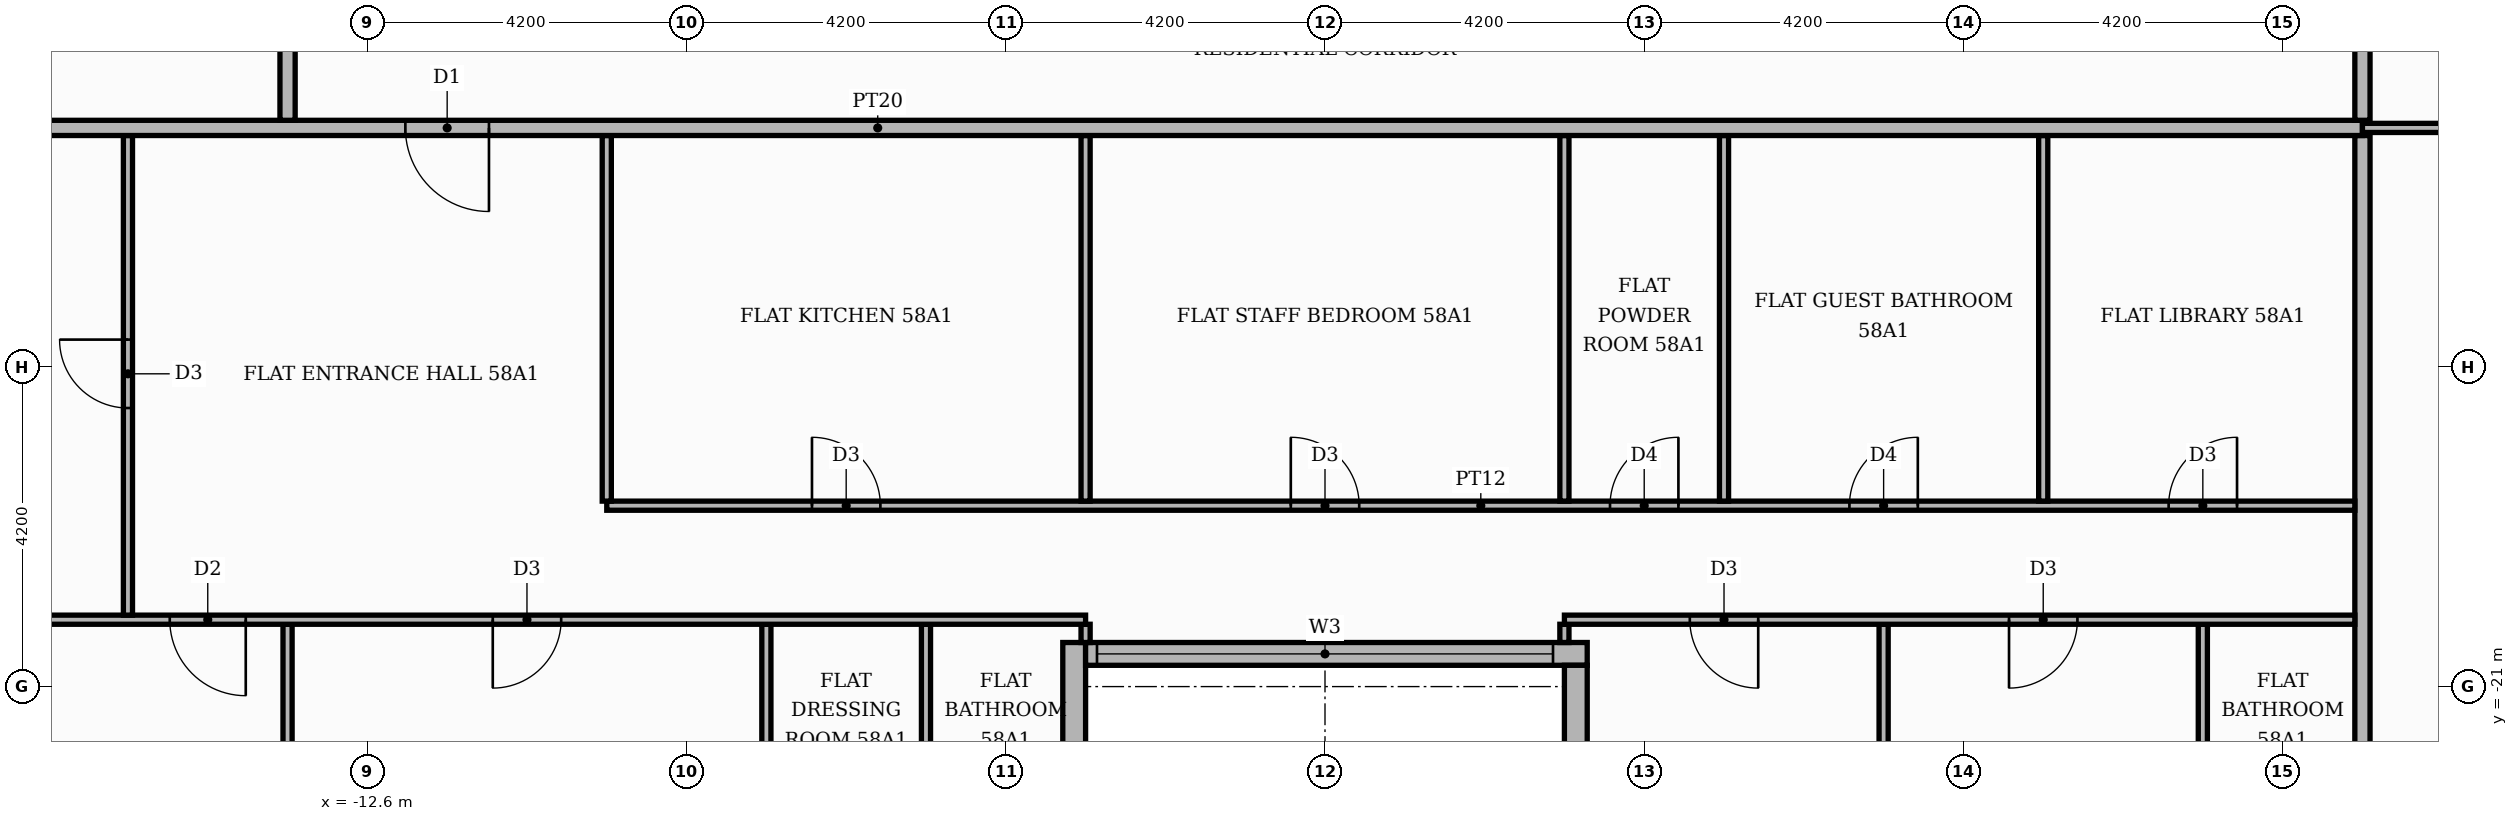
"""IFC4 building model, lengths in metres.
Left out: names, types, materials, properties, quantities, classifications, styles, units other than length and angle.
Written with IfcOpenShell. Run it as: python <this file> out.ifc"""

import sys

from ifc_helpers import new_model, si_unit, direction, frame, frame_2d, origin, place, context, subcontext, project, spatial, rectangle, extrude, element, fill, save


model = new_model("IFC4")
c1 = context("Model", 3, precision=1e-05, world=origin(), true_north=direction((0.0, 1.0)))
c2 = subcontext(c1, "Body", "Model", "MODEL_VIEW")
j1 = project(units=[si_unit("LENGTHUNIT", "METRE"), si_unit("PLANEANGLEUNIT", "RADIAN")], contexts=[c1])
p1 = place(None, origin())
s1 = spatial("IfcSite", under=j1, at=p1, CompositionType="ELEMENT")
p2 = place(p1, origin())
s2 = spatial("IfcBuilding", under=s1, at=p2, CompositionType="ELEMENT")
p3 = place(p2, frame((0.0, 0.0, 244.5)))
s3 = spatial("IfcBuildingStorey", under=s2, at=p3, CompositionType="ELEMENT", Elevation=244.5)
p4 = place(p3, frame((-3.3, -25.42, 0.0), z_axis=(0.0, 0.0, 1.0), x_axis=(0.0, 1.0, 0.0)))
e1 = element("IfcWall", 1, at=p4, inside=s3, PredefinedType="STANDARD", context=c2, shape_type="SweptSolid", body=[
    extrude(rectangle(XDim=5.0, YDim=0.3, at=frame_2d((2.5, 0.0))), origin(), (0.0, 0.0, 1.0), 3.48),
])
p5 = place(p4, frame((1.42, 0.0, 0.9)))
e2 = element("IfcOpeningElement", 2, at=p5, cuts=e1, PredefinedType="OPENING", context=c2, shape_type="SweptSolid", body=[
    extrude(rectangle(XDim=1.8, YDim=2.1, at=frame_2d((0.9, 1.05))), frame((0.0, 0.16, 0.0), z_axis=(0.0, -1.0, 0.0), x_axis=(1.0, 0.0, 0.0)), (0.0, 0.0, 1.0), 0.32),
])
p6 = place(p3, frame((-3.15, -20.57, 0.0), z_axis=(0.0, 0.0, 1.0), x_axis=(1.0, 0.0, 0.0)))
e3 = element("IfcWall", 3, at=p6, inside=s3, PredefinedType="STANDARD", context=c2, shape_type="SweptSolid", body=[
    extrude(rectangle(XDim=6.6, YDim=0.3, at=frame_2d((3.3, 0.0))), origin(), (0.0, 0.0, 1.0), 3.48),
])
p7 = place(p6, frame((0.15, 0.0, 0.9)))
e4 = element("IfcOpeningElement", 4, at=p7, cuts=e3, PredefinedType="OPENING", context=c2, shape_type="SweptSolid", body=[
    extrude(rectangle(XDim=6.0, YDim=2.1, at=frame_2d((3.0, 1.05))), frame((0.0, 0.16, 0.0), z_axis=(0.0, -1.0, 0.0), x_axis=(1.0, 0.0, 0.0)), (0.0, 0.0, 1.0), 0.32),
])
p8 = place(p3, frame((3.3, -20.72, 0.0), z_axis=(0.0, 0.0, 1.0), x_axis=(0.0, -1.0, 0.0)))
e5 = element("IfcWall", 5, at=p8, inside=s3, PredefinedType="STANDARD", context=c2, shape_type="SweptSolid", body=[
    extrude(rectangle(XDim=5.0, YDim=0.3, at=frame_2d((2.5, 0.0))), origin(), (0.0, 0.0, 1.0), 3.48),
])
p9 = place(p8, frame((1.48, 0.0, 0.9)))
e6 = element("IfcOpeningElement", 6, at=p9, cuts=e5, PredefinedType="OPENING", context=c2, shape_type="SweptSolid", body=[
    extrude(rectangle(XDim=1.8, YDim=2.1, at=frame_2d((0.9, 1.05))), frame((0.0, 0.16, 0.0), z_axis=(0.0, -1.0, 0.0), x_axis=(1.0, 0.0, 0.0)), (0.0, 0.0, 1.0), 0.32),
])
p10 = place(p3, frame((-13.65, -25.42, 0.0), z_axis=(0.0, 0.0, 1.0), x_axis=(0.0, 1.0, 0.0)))
e7 = element("IfcWall", 7, at=p10, inside=s3, PredefinedType="PARTITIONING", context=c2, shape_type="SweptSolid", body=[
    extrude(rectangle(XDim=5.24, YDim=0.12, at=frame_2d((2.62, 0.0))), origin(), (0.0, 0.0, 1.0), 3.48),
])
p11 = place(p3, frame((-7.35, -25.42, 0.0), z_axis=(0.0, 0.0, 1.0), x_axis=(0.0, 1.0, 0.0)))
e8 = element("IfcWall", 8, at=p11, inside=s3, PredefinedType="PARTITIONING", context=c2, shape_type="SweptSolid", body=[
    extrude(rectangle(XDim=5.24, YDim=0.12, at=frame_2d((2.62, 0.0))), origin(), (0.0, 0.0, 1.0), 3.48),
])
p12 = place(p11, frame((2.05, 0.0, 0.0)))
e9 = element("IfcOpeningElement", 9, at=p12, cuts=e8, PredefinedType="OPENING", context=c2, shape_type="SweptSolid", body=[
    extrude(rectangle(XDim=0.9, YDim=2.1, at=frame_2d((0.45, 1.05))), frame((0.0, 0.07, 0.0), z_axis=(0.0, -1.0, 0.0), x_axis=(1.0, 0.0, 0.0)), (0.0, 0.0, 1.0), 0.14),
])
p13 = place(p3, frame((-5.25, -25.42, 0.0), z_axis=(0.0, 0.0, 1.0), x_axis=(0.0, 1.0, 0.0)))
e10 = element("IfcWall", 10, at=p13, inside=s3, PredefinedType="PARTITIONING", context=c2, shape_type="SweptSolid", body=[
    extrude(rectangle(XDim=5.24, YDim=0.12, at=frame_2d((2.62, 0.0))), origin(), (0.0, 0.0, 1.0), 3.48),
])
p14 = place(p13, frame((2.05, 0.0, 0.0)))
e11 = element("IfcOpeningElement", 11, at=p14, cuts=e10, PredefinedType="OPENING", context=c2, shape_type="SweptSolid", body=[
    extrude(rectangle(XDim=0.9, YDim=2.1, at=frame_2d((0.45, 1.05))), frame((0.0, 0.07, 0.0), z_axis=(0.0, -1.0, 0.0), x_axis=(1.0, 0.0, 0.0)), (0.0, 0.0, 1.0), 0.14),
])
p15 = place(p3, frame((7.35, -25.42, 0.0), z_axis=(0.0, 0.0, 1.0), x_axis=(0.0, 1.0, 0.0)))
e12 = element("IfcWall", 12, at=p15, inside=s3, PredefinedType="PARTITIONING", context=c2, shape_type="SweptSolid", body=[
    extrude(rectangle(XDim=5.24, YDim=0.12, at=frame_2d((2.62, 0.0))), origin(), (0.0, 0.0, 1.0), 3.48),
])
p16 = place(p3, frame((11.55, -25.42, 0.0), z_axis=(0.0, 0.0, 1.0), x_axis=(0.0, 1.0, 0.0)))
e13 = element("IfcWall", 13, at=p16, inside=s3, PredefinedType="PARTITIONING", context=c2, shape_type="SweptSolid", body=[
    extrude(rectangle(XDim=5.24, YDim=0.12, at=frame_2d((2.62, 0.0))), origin(), (0.0, 0.0, 1.0), 3.48),
])
p17 = place(p16, frame((2.05, 0.0, 0.0)))
e14 = element("IfcOpeningElement", 14, at=p17, cuts=e13, PredefinedType="OPENING", context=c2, shape_type="SweptSolid", body=[
    extrude(rectangle(XDim=0.9, YDim=2.1, at=frame_2d((0.45, 1.05))), frame((0.0, 0.07, 0.0), z_axis=(0.0, -1.0, 0.0), x_axis=(1.0, 0.0, 0.0)), (0.0, 0.0, 1.0), 0.14),
])
p18 = place(p3, frame((13.65, -25.42, 0.0), z_axis=(0.0, 0.0, 1.0), x_axis=(0.0, 1.0, 0.0)))
e15 = element("IfcWall", 15, at=p18, inside=s3, PredefinedType="PARTITIONING", context=c2, shape_type="SweptSolid", body=[
    extrude(rectangle(XDim=11.67, YDim=0.2, at=frame_2d((5.835, 0.0))), origin(), (0.0, 0.0, 1.0), 3.48),
])
for number, where, z_axis, x_axis in (
    (16, (-3.15, -20.42, 0.0), (0.0, 0.0, 1.0), (0.0, 1.0, 0.0)),
    (17, (3.15, -20.42, 0.0), (0.0, 0.0, 1.0), (0.0, 1.0, 0.0)),
):
    element("IfcWall", number, at=place(p3, frame(where, z_axis=z_axis, x_axis=x_axis)), inside=s3, PredefinedType="PARTITIONING", context=c2, shape_type="SweptSolid", body=[
        extrude(rectangle(XDim=0.24, YDim=0.12, at=frame_2d((0.12, 0.0))), origin(), (0.0, 0.0, 1.0), 3.48),
    ])
p19 = place(p3, frame((-20.719, -20.12, 0.0), z_axis=(0.0, 0.0, 1.0), x_axis=(1.0, 0.0, 0.0)))
e18 = element("IfcWall", 18, at=p19, inside=s3, PredefinedType="PARTITIONING", context=c2, shape_type="SweptSolid", body=[
    extrude(rectangle(XDim=17.569, YDim=0.12, at=frame_2d((8.785, 0.0))), origin(), (0.0, 0.0, 1.0), 3.48),
])
p20 = place(p19, frame((5.519, 0.0, 0.0)))
e19 = element("IfcOpeningElement", 19, at=p20, cuts=e18, PredefinedType="OPENING", context=c2, shape_type="SweptSolid", body=[
    extrude(rectangle(XDim=1.0, YDim=2.1, at=frame_2d((0.5, 1.05))), frame((0.0, 0.07, 0.0), z_axis=(0.0, -1.0, 0.0), x_axis=(1.0, 0.0, 0.0)), (0.0, 0.0, 1.0), 0.14),
])
p21 = place(p19, frame((9.769, 0.0, 0.0)))
e20 = element("IfcOpeningElement", 20, at=p21, cuts=e18, PredefinedType="OPENING", context=c2, shape_type="SweptSolid", body=[
    extrude(rectangle(XDim=0.9, YDim=2.1, at=frame_2d((0.45, 1.05))), frame((0.0, 0.07, 0.0), z_axis=(0.0, -1.0, 0.0), x_axis=(1.0, 0.0, 0.0)), (0.0, 0.0, 1.0), 0.14),
])
p22 = place(p3, frame((3.15, -20.12, 0.0), z_axis=(0.0, 0.0, 1.0), x_axis=(1.0, 0.0, 0.0)))
e21 = element("IfcWall", 21, at=p22, inside=s3, PredefinedType="PARTITIONING", context=c2, shape_type="SweptSolid", body=[
    extrude(rectangle(XDim=10.4, YDim=0.12, at=frame_2d((5.2, 0.0))), origin(), (0.0, 0.0, 1.0), 3.48),
])
p23 = place(p22, frame((1.65, 0.0, 0.0)))
e22 = element("IfcOpeningElement", 22, at=p23, cuts=e21, PredefinedType="OPENING", context=c2, shape_type="SweptSolid", body=[
    extrude(rectangle(XDim=0.9, YDim=2.1, at=frame_2d((0.45, 1.05))), frame((0.0, 0.07, 0.0), z_axis=(0.0, -1.0, 0.0), x_axis=(1.0, 0.0, 0.0)), (0.0, 0.0, 1.0), 0.14),
])
p24 = place(p22, frame((5.85, 0.0, 0.0)))
e23 = element("IfcOpeningElement", 23, at=p24, cuts=e21, PredefinedType="OPENING", context=c2, shape_type="SweptSolid", body=[
    extrude(rectangle(XDim=0.9, YDim=2.1, at=frame_2d((0.45, 1.05))), frame((0.0, 0.07, 0.0), z_axis=(0.0, -1.0, 0.0), x_axis=(1.0, 0.0, 0.0)), (0.0, 0.0, 1.0), 0.14),
])
p25 = place(p3, frame((-15.75, -20.06, 0.0), z_axis=(0.0, 0.0, 1.0), x_axis=(0.0, 1.0, 0.0)))
e24 = element("IfcWall", 24, at=p25, inside=s3, PredefinedType="PARTITIONING", context=c2, shape_type="SweptSolid", body=[
    extrude(rectangle(XDim=6.31, YDim=0.12, at=frame_2d((3.155, 0.0))), origin(), (0.0, 0.0, 1.0), 3.48),
])
p26 = place(p25, frame((2.725, 0.0, 0.0)))
e25 = element("IfcOpeningElement", 25, at=p26, cuts=e24, PredefinedType="OPENING", context=c2, shape_type="SweptSolid", body=[
    extrude(rectangle(XDim=0.9, YDim=2.1, at=frame_2d((0.45, 1.05))), frame((0.0, 0.07, 0.0), z_axis=(0.0, -1.0, 0.0), x_axis=(1.0, 0.0, 0.0)), (0.0, 0.0, 1.0), 0.14),
])
p27 = place(p3, frame((-9.45, -18.62, 0.0), z_axis=(0.0, 0.0, 1.0), x_axis=(1.0, 0.0, 0.0)))
e26 = element("IfcWall", 26, at=p27, inside=s3, PredefinedType="PARTITIONING", context=c2, shape_type="SweptSolid", body=[
    extrude(rectangle(XDim=23.0, YDim=0.12, at=frame_2d((11.5, 0.0))), origin(), (0.0, 0.0, 1.0), 3.48),
])
p28 = place(p27, frame((2.7, 0.0, 0.0)))
e27 = element("IfcOpeningElement", 27, at=p28, cuts=e26, PredefinedType="OPENING", context=c2, shape_type="SweptSolid", body=[
    extrude(rectangle(XDim=0.9, YDim=2.1, at=frame_2d((0.45, 1.05))), frame((0.0, 0.07, 0.0), z_axis=(0.0, -1.0, 0.0), x_axis=(1.0, 0.0, 0.0)), (0.0, 0.0, 1.0), 0.14),
])
p29 = place(p27, frame((9.0, 0.0, 0.0)))
e28 = element("IfcOpeningElement", 28, at=p29, cuts=e26, PredefinedType="OPENING", context=c2, shape_type="SweptSolid", body=[
    extrude(rectangle(XDim=0.9, YDim=2.1, at=frame_2d((0.45, 1.05))), frame((0.0, 0.07, 0.0), z_axis=(0.0, -1.0, 0.0), x_axis=(1.0, 0.0, 0.0)), (0.0, 0.0, 1.0), 0.14),
])
p30 = place(p27, frame((13.2, 0.0, 0.0)))
e29 = element("IfcOpeningElement", 29, at=p30, cuts=e26, PredefinedType="OPENING", context=c2, shape_type="SweptSolid", body=[
    extrude(rectangle(XDim=0.9, YDim=2.1, at=frame_2d((0.45, 1.05))), frame((0.0, 0.07, 0.0), z_axis=(0.0, -1.0, 0.0), x_axis=(1.0, 0.0, 0.0)), (0.0, 0.0, 1.0), 0.14),
])
p31 = place(p27, frame((16.35, 0.0, 0.0)))
e30 = element("IfcOpeningElement", 30, at=p31, cuts=e26, PredefinedType="OPENING", context=c2, shape_type="SweptSolid", body=[
    extrude(rectangle(XDim=0.9, YDim=2.1, at=frame_2d((0.45, 1.05))), frame((0.0, 0.07, 0.0), z_axis=(0.0, -1.0, 0.0), x_axis=(1.0, 0.0, 0.0)), (0.0, 0.0, 1.0), 0.14),
])
p32 = place(p27, frame((20.55, 0.0, 0.0)))
e31 = element("IfcOpeningElement", 31, at=p32, cuts=e26, PredefinedType="OPENING", context=c2, shape_type="SweptSolid", body=[
    extrude(rectangle(XDim=0.9, YDim=2.1, at=frame_2d((0.45, 1.05))), frame((0.0, 0.07, 0.0), z_axis=(0.0, -1.0, 0.0), x_axis=(1.0, 0.0, 0.0)), (0.0, 0.0, 1.0), 0.14),
])
for number, where, z_axis, x_axis in (
    (32, (-9.45, -18.56, 0.0), (0.0, 0.0, 1.0), (0.0, 1.0, 0.0)),
    (33, (-3.15, -18.56, 0.0), (0.0, 0.0, 1.0), (0.0, 1.0, 0.0)),
    (34, (3.15, -18.56, 0.0), (0.0, 0.0, 1.0), (0.0, 1.0, 0.0)),
    (35, (5.25, -18.56, 0.0), (0.0, 0.0, 1.0), (0.0, 1.0, 0.0)),
    (36, (9.45, -18.56, 0.0), (0.0, 0.0, 1.0), (0.0, 1.0, 0.0)),
):
    element("IfcWall", number, at=place(p3, frame(where, z_axis=z_axis, x_axis=x_axis)), inside=s3, PredefinedType="PARTITIONING", context=c2, shape_type="SweptSolid", body=[
        extrude(rectangle(XDim=4.81, YDim=0.12, at=frame_2d((2.405, 0.0))), origin(), (0.0, 0.0, 1.0), 3.48),
    ])
p33 = place(p3, frame((-25.42, -13.65, 0.0), z_axis=(0.0, 0.0, 1.0), x_axis=(1.0, 0.0, 0.0)))
e37 = element("IfcWall", 37, at=p33, inside=s3, PredefinedType="PARTITIONING", context=c2, shape_type="SweptSolid", body=[
    extrude(rectangle(XDim=39.07, YDim=0.2, at=frame_2d((19.535, 0.0))), origin(), (0.0, 0.0, 1.0), 3.48),
])
p34 = place(p33, frame((13.32, 0.0, 0.0)))
e38 = element("IfcOpeningElement", 38, at=p34, cuts=e37, PredefinedType="OPENING", context=c2, shape_type="SweptSolid", body=[
    extrude(rectangle(XDim=1.1, YDim=2.4, at=frame_2d((0.55, 1.2))), frame((0.0, 0.11, 0.0), z_axis=(0.0, -1.0, 0.0), x_axis=(1.0, 0.0, 0.0)), (0.0, 0.0, 1.0), 0.22),
])
p35 = place(p3, frame((13.65, -13.65, 0.0), z_axis=(0.0, 0.0, 1.0), x_axis=(1.0, 0.0, 0.0)))
e39 = element("IfcWall", 39, at=p35, inside=s3, PredefinedType="PARTITIONING", context=c2, shape_type="SweptSolid", body=[
    extrude(rectangle(XDim=7.07, YDim=0.12, at=frame_2d((3.535, 0.0))), origin(), (0.0, 0.0, 1.0), 3.48),
])
p36 = place(p35, frame((3.085, 0.0, 0.0)))
e40 = element("IfcOpeningElement", 40, at=p36, cuts=e39, PredefinedType="OPENING", context=c2, shape_type="SweptSolid", body=[
    extrude(rectangle(XDim=0.9, YDim=2.1, at=frame_2d((0.45, 1.05))), frame((0.0, 0.07, 0.0), z_axis=(0.0, -1.0, 0.0), x_axis=(1.0, 0.0, 0.0)), (0.0, 0.0, 1.0), 0.14),
])
for number, where, z_axis, x_axis in (
    (41, (-13.65, -13.55, 0.0), (0.0, 0.0, 1.0), (0.0, 1.0, 0.0)),
    (42, (13.65, -13.55, 0.0), (0.0, 0.0, 1.0), (0.0, 1.0, 0.0)),
):
    element("IfcWall", number, at=place(p3, frame(where, z_axis=z_axis, x_axis=x_axis)), inside=s3, PredefinedType="PARTITIONING", context=c2, shape_type="SweptSolid", body=[
        extrude(rectangle(XDim=2.45, YDim=0.2, at=frame_2d((1.225, 0.0))), origin(), (0.0, 0.0, 1.0), 3.48),
    ])
p37 = place(p7, origin())
e43 = element("IfcWindow", 43, at=p37, inside=s3, PartitioningType="SINGLE_PANEL", PredefinedType="WINDOW", context=c2, shape_type="SweptSolid", body=[
    extrude(rectangle(XDim=6.0, YDim=2.1, at=frame_2d((3.0, 1.05))), frame((0.0, 0.03, 0.0), z_axis=(0.0, -1.0, 0.0), x_axis=(1.0, 0.0, 0.0)), (0.0, 0.0, 1.0), 0.06),
])
fill(e4, e43)
p38 = place(p34, frame((1.1, 0.0, 0.0), z_axis=(0.0, 0.0, 1.0), x_axis=(-1.0, 0.0, 0.0)))
e44 = element("IfcDoor", 44, at=p38, inside=s3, OperationType="SINGLE_SWING_RIGHT", PredefinedType="DOOR", context=c2, shape_type="SweptSolid", body=[
    extrude(rectangle(XDim=1.1, YDim=2.4, at=frame_2d((0.55, 1.2))), frame((0.0, 0.025, 0.0), z_axis=(0.0, -1.0, 0.0), x_axis=(1.0, 0.0, 0.0)), (0.0, 0.0, 1.0), 0.05),
])
fill(e38, e44)
p39 = place(p26, origin())
e45 = element("IfcDoor", 45, at=p39, inside=s3, OperationType="SINGLE_SWING_RIGHT", PredefinedType="DOOR", context=c2, shape_type="SweptSolid", body=[
    extrude(rectangle(XDim=0.9, YDim=2.1, at=frame_2d((0.45, 1.05))), frame((0.0, 0.025, 0.0), z_axis=(0.0, -1.0, 0.0), x_axis=(1.0, 0.0, 0.0)), (0.0, 0.0, 1.0), 0.05),
])
fill(e25, e45)
p40 = place(p28, origin())
e46 = element("IfcDoor", 46, at=p40, inside=s3, OperationType="SINGLE_SWING_LEFT", PredefinedType="DOOR", context=c2, shape_type="SweptSolid", body=[
    extrude(rectangle(XDim=0.9, YDim=2.1, at=frame_2d((0.45, 1.05))), frame((0.0, 0.025, 0.0), z_axis=(0.0, -1.0, 0.0), x_axis=(1.0, 0.0, 0.0)), (0.0, 0.0, 1.0), 0.05),
])
fill(e27, e46)
p41 = place(p29, origin())
e47 = element("IfcDoor", 47, at=p41, inside=s3, OperationType="SINGLE_SWING_LEFT", PredefinedType="DOOR", context=c2, shape_type="SweptSolid", body=[
    extrude(rectangle(XDim=0.9, YDim=2.1, at=frame_2d((0.45, 1.05))), frame((0.0, 0.025, 0.0), z_axis=(0.0, -1.0, 0.0), x_axis=(1.0, 0.0, 0.0)), (0.0, 0.0, 1.0), 0.05),
])
fill(e28, e47)
p42 = place(p30, origin())
e48 = element("IfcDoor", 48, at=p42, inside=s3, OperationType="SINGLE_SWING_RIGHT", PredefinedType="DOOR", context=c2, shape_type="SweptSolid", body=[
    extrude(rectangle(XDim=0.9, YDim=2.1, at=frame_2d((0.45, 1.05))), frame((0.0, 0.025, 0.0), z_axis=(0.0, -1.0, 0.0), x_axis=(1.0, 0.0, 0.0)), (0.0, 0.0, 1.0), 0.05),
])
fill(e29, e48)
p43 = place(p31, origin())
e49 = element("IfcDoor", 49, at=p43, inside=s3, OperationType="SINGLE_SWING_RIGHT", PredefinedType="DOOR", context=c2, shape_type="SweptSolid", body=[
    extrude(rectangle(XDim=0.9, YDim=2.1, at=frame_2d((0.45, 1.05))), frame((0.0, 0.025, 0.0), z_axis=(0.0, -1.0, 0.0), x_axis=(1.0, 0.0, 0.0)), (0.0, 0.0, 1.0), 0.05),
])
fill(e30, e49)
p44 = place(p32, origin())
e50 = element("IfcDoor", 50, at=p44, inside=s3, OperationType="SINGLE_SWING_RIGHT", PredefinedType="DOOR", context=c2, shape_type="SweptSolid", body=[
    extrude(rectangle(XDim=0.9, YDim=2.1, at=frame_2d((0.45, 1.05))), frame((0.0, 0.025, 0.0), z_axis=(0.0, -1.0, 0.0), x_axis=(1.0, 0.0, 0.0)), (0.0, 0.0, 1.0), 0.05),
])
fill(e31, e50)
p45 = place(p20, frame((1.0, 0.0, 0.0), z_axis=(0.0, 0.0, 1.0), x_axis=(-1.0, 0.0, 0.0)))
e51 = element("IfcDoor", 51, at=p45, inside=s3, OperationType="SINGLE_SWING_RIGHT", PredefinedType="DOOR", context=c2, shape_type="SweptSolid", body=[
    extrude(rectangle(XDim=1.0, YDim=2.1, at=frame_2d((0.5, 1.05))), frame((0.0, 0.025, 0.0), z_axis=(0.0, -1.0, 0.0), x_axis=(1.0, 0.0, 0.0)), (0.0, 0.0, 1.0), 0.05),
])
fill(e19, e51)
p46 = place(p21, frame((0.9, 0.0, 0.0), z_axis=(0.0, 0.0, 1.0), x_axis=(-1.0, 0.0, 0.0)))
e52 = element("IfcDoor", 52, at=p46, inside=s3, OperationType="SINGLE_SWING_LEFT", PredefinedType="DOOR", context=c2, shape_type="SweptSolid", body=[
    extrude(rectangle(XDim=0.9, YDim=2.1, at=frame_2d((0.45, 1.05))), frame((0.0, 0.025, 0.0), z_axis=(0.0, -1.0, 0.0), x_axis=(1.0, 0.0, 0.0)), (0.0, 0.0, 1.0), 0.05),
])
fill(e20, e52)
p47 = place(p23, frame((0.9, 0.0, 0.0), z_axis=(0.0, 0.0, 1.0), x_axis=(-1.0, 0.0, 0.0)))
e53 = element("IfcDoor", 53, at=p47, inside=s3, OperationType="SINGLE_SWING_RIGHT", PredefinedType="DOOR", context=c2, shape_type="SweptSolid", body=[
    extrude(rectangle(XDim=0.9, YDim=2.1, at=frame_2d((0.45, 1.05))), frame((0.0, 0.025, 0.0), z_axis=(0.0, -1.0, 0.0), x_axis=(1.0, 0.0, 0.0)), (0.0, 0.0, 1.0), 0.05),
])
fill(e22, e53)
p48 = place(p24, frame((0.9, 0.0, 0.0), z_axis=(0.0, 0.0, 1.0), x_axis=(-1.0, 0.0, 0.0)))
e54 = element("IfcDoor", 54, at=p48, inside=s3, OperationType="SINGLE_SWING_LEFT", PredefinedType="DOOR", context=c2, shape_type="SweptSolid", body=[
    extrude(rectangle(XDim=0.9, YDim=2.1, at=frame_2d((0.45, 1.05))), frame((0.0, 0.025, 0.0), z_axis=(0.0, -1.0, 0.0), x_axis=(1.0, 0.0, 0.0)), (0.0, 0.0, 1.0), 0.05),
])
fill(e23, e54)
save(model, sys.argv[1])
